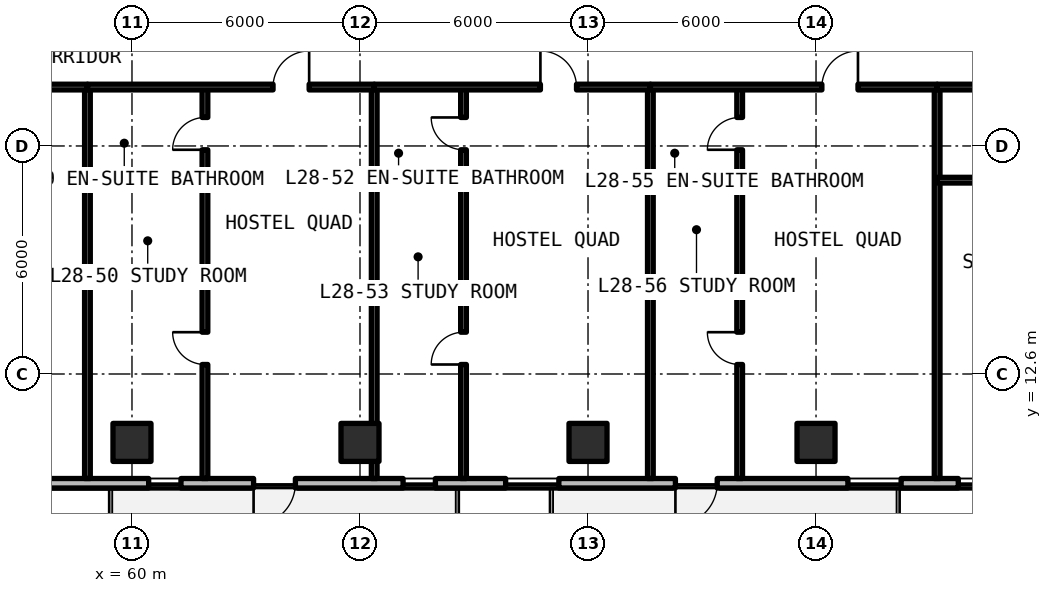
"""IFC4 building model, lengths in metres.
Left out: names, types, materials, properties, quantities, classifications, styles, units other than length and angle.
Written with IfcOpenShell. Run it as: python <this file> out.ifc"""

import sys

from ifc_helpers import new_model, si_unit, direction, frame, frame_2d, origin, origin_2d, place, context, subcontext, project, spatial, rectangle, extrude, element, fill, save


model = new_model("IFC4")
c1 = context("Model", 3, precision=1e-05, world=origin(), true_north=direction((0.0, 1.0)))
c2 = subcontext(c1, "Body", "Model", "MODEL_VIEW")
j1 = project(units=[si_unit("LENGTHUNIT", "METRE"), si_unit("PLANEANGLEUNIT", "RADIAN")], contexts=[c1])
p1 = place(None, origin())
s1 = spatial("IfcSite", under=j1, at=p1, CompositionType="ELEMENT")
p2 = place(p1, origin())
s2 = spatial("IfcBuilding", under=s1, at=p2, CompositionType="ELEMENT")
p3 = place(p2, frame((0.0, 0.0, 101.97)))
s3 = spatial("IfcBuildingStorey", under=s2, at=p3, CompositionType="ELEMENT", Elevation=101.97)
for number, where, z_axis, x_axis in (
    (1, (60.0, 10.8, 0.0), (0.0, 0.0, 1.0), (1.0, 0.0, 0.0)),
    (2, (66.0, 10.8, 0.0), (0.0, 0.0, 1.0), (1.0, 0.0, 0.0)),
    (3, (72.0, 10.8, 0.0), (0.0, 0.0, 1.0), (1.0, 0.0, 0.0)),
    (4, (78.0, 10.8, 0.0), (0.0, 0.0, 1.0), (1.0, 0.0, 0.0)),
):
    element("IfcColumn", number, at=place(p3, frame(where, z_axis=z_axis, x_axis=x_axis)), inside=s3, PredefinedType="COLUMN", context=c2, shape_type="SweptSolid", body=[
        extrude(rectangle(XDim=1.0, YDim=1.0, at=origin_2d()), origin(), (0.0, 0.0, 1.0), 3.3),
    ])
p4 = place(p3, frame((52.125, 9.725, 0.0), z_axis=(0.0, 0.0, 1.0), x_axis=(1.0, 0.0, 0.0)))
e5 = element("IfcWall", 5, at=p4, inside=s3, PredefinedType="SOLIDWALL", context=c2, shape_type="SweptSolid", body=[
    extrude(rectangle(XDim=44.023, YDim=0.25, at=frame_2d((22.012, 0.0))), origin(), (0.0, 0.0, 1.0), 3.08),
])
p5 = place(p4, frame((11.075, 0.0, 0.0)))
e6 = element("IfcOpeningElement", 6, at=p5, cuts=e5, PredefinedType="OPENING", context=c2, shape_type="SweptSolid", body=[
    extrude(rectangle(XDim=1.1, YDim=2.15, at=frame_2d((0.55, 1.075))), frame((0.0, 0.135, 0.0), z_axis=(0.0, -1.0, 0.0), x_axis=(1.0, 0.0, 0.0)), (0.0, 0.0, 1.0), 0.27),
])
p6 = place(p4, frame((22.175, 0.0, 0.0)))
e7 = element("IfcOpeningElement", 7, at=p6, cuts=e5, PredefinedType="OPENING", context=c2, shape_type="SweptSolid", body=[
    extrude(rectangle(XDim=1.1, YDim=2.15, at=frame_2d((0.55, 1.075))), frame((0.0, 0.135, 0.0), z_axis=(0.0, -1.0, 0.0), x_axis=(1.0, 0.0, 0.0)), (0.0, 0.0, 1.0), 0.27),
])
p7 = place(p4, frame((34.525, 0.0, 0.0)))
e8 = element("IfcOpeningElement", 8, at=p7, cuts=e5, PredefinedType="OPENING", context=c2, shape_type="SweptSolid", body=[
    extrude(rectangle(XDim=1.1, YDim=2.15, at=frame_2d((0.55, 1.075))), frame((0.0, 0.135, 0.0), z_axis=(0.0, -1.0, 0.0), x_axis=(1.0, 0.0, 0.0)), (0.0, 0.0, 1.0), 0.27),
])
p8 = place(p4, frame((2.669, 0.0, 0.78)))
e9 = element("IfcOpeningElement", 9, at=p8, cuts=e5, PredefinedType="OPENING", context=c2, shape_type="SweptSolid", body=[
    extrude(rectangle(XDim=2.0, YDim=1.66, at=frame_2d((1.0, 0.83))), frame((0.0, 0.135, 0.0), z_axis=(0.0, -1.0, 0.0), x_axis=(1.0, 0.0, 0.0)), (0.0, 0.0, 1.0), 0.27),
])
p9 = place(p4, frame((8.314, 0.0, 0.78)))
e10 = element("IfcOpeningElement", 10, at=p9, cuts=e5, PredefinedType="OPENING", context=c2, shape_type="SweptSolid", body=[
    extrude(rectangle(XDim=0.85, YDim=1.65, at=frame_2d((0.425, 0.825))), frame((0.0, 0.135, 0.0), z_axis=(0.0, -1.0, 0.0), x_axis=(1.0, 0.0, 0.0)), (0.0, 0.0, 1.0), 0.27),
])
p10 = place(p4, frame((15.009, 0.0, 0.78)))
e11 = element("IfcOpeningElement", 11, at=p10, cuts=e5, PredefinedType="OPENING", context=c2, shape_type="SweptSolid", body=[
    extrude(rectangle(XDim=0.85, YDim=1.65, at=frame_2d((0.425, 0.825))), frame((0.0, 0.135, 0.0), z_axis=(0.0, -1.0, 0.0), x_axis=(1.0, 0.0, 0.0)), (0.0, 0.0, 1.0), 0.27),
])
p11 = place(p4, frame((17.708, 0.0, 0.78)))
e12 = element("IfcOpeningElement", 12, at=p11, cuts=e5, PredefinedType="OPENING", context=c2, shape_type="SweptSolid", body=[
    extrude(rectangle(XDim=1.4, YDim=1.65, at=frame_2d((0.7, 0.825))), frame((0.0, 0.135, 0.0), z_axis=(0.0, -1.0, 0.0), x_axis=(1.0, 0.0, 0.0)), (0.0, 0.0, 1.0), 0.27),
])
p12 = place(p4, frame((26.714, 0.0, 0.78)))
e13 = element("IfcOpeningElement", 13, at=p12, cuts=e5, PredefinedType="OPENING", context=c2, shape_type="SweptSolid", body=[
    extrude(rectangle(XDim=1.4, YDim=1.65, at=frame_2d((0.7, 0.825))), frame((0.0, 0.135, 0.0), z_axis=(0.0, -1.0, 0.0), x_axis=(1.0, 0.0, 0.0)), (0.0, 0.0, 1.0), 0.27),
])
p13 = place(p4, frame((29.618, 0.0, 0.78)))
e14 = element("IfcOpeningElement", 14, at=p13, cuts=e5, PredefinedType="OPENING", context=c2, shape_type="SweptSolid", body=[
    extrude(rectangle(XDim=1.4, YDim=1.65, at=frame_2d((0.7, 0.825))), frame((0.0, 0.135, 0.0), z_axis=(0.0, -1.0, 0.0), x_axis=(1.0, 0.0, 0.0)), (0.0, 0.0, 1.0), 0.27),
])
p14 = place(p4, frame((39.102, 0.0, 0.78)))
e15 = element("IfcOpeningElement", 15, at=p14, cuts=e5, PredefinedType="OPENING", context=c2, shape_type="SweptSolid", body=[
    extrude(rectangle(XDim=2.0, YDim=1.66, at=frame_2d((1.0, 0.83))), frame((0.0, 0.135, 0.0), z_axis=(0.0, -1.0, 0.0), x_axis=(1.0, 0.0, 0.0)), (0.0, 0.0, 1.0), 0.27),
])
p15 = place(p3, frame((58.828, 9.85, 0.0), z_axis=(0.0, 0.0, 1.0), x_axis=(0.0, 1.0, 0.0)))
e16 = element("IfcWall", 16, at=p15, inside=s3, PredefinedType="SOLIDWALL", context=c2, shape_type="SweptSolid", body=[
    extrude(rectangle(XDim=10.3, YDim=0.15, at=frame_2d((5.15, 0.0))), origin(), (0.0, 0.0, 1.0), 2.35),
])
p16 = place(p3, frame((52.12, 20.15, 0.0), z_axis=(0.0, 0.0, 1.0), x_axis=(1.0, 0.0, 0.0)))
e17 = element("IfcWall", 17, at=p16, inside=s3, PredefinedType="SOLIDWALL", context=c2, shape_type="SweptSolid", body=[
    extrude(rectangle(XDim=6.708, YDim=0.15, at=frame_2d((3.354, 0.0))), origin(), (0.0, 0.0, 1.0), 2.35),
])
p17 = place(p16, frame((2.879, 0.0, 0.0)))
e18 = element("IfcOpeningElement", 18, at=p17, cuts=e17, PredefinedType="OPENING", context=c2, shape_type="SweptSolid", body=[
    extrude(rectangle(XDim=0.95, YDim=2.15, at=frame_2d((0.475, 1.075))), frame((0.0, 0.085, 0.0), z_axis=(0.0, -1.0, 0.0), x_axis=(1.0, 0.0, 0.0)), (0.0, 0.0, 1.0), 0.17),
])
p18 = place(p3, frame((66.374, 9.85, 0.0), z_axis=(0.0, 0.0, 1.0), x_axis=(0.0, 1.0, 0.0)))
e19 = element("IfcWall", 19, at=p18, inside=s3, PredefinedType="SOLIDWALL", context=c2, shape_type="SweptSolid", body=[
    extrude(rectangle(XDim=10.3, YDim=0.15, at=frame_2d((5.15, 0.0))), origin(), (0.0, 0.0, 1.0), 2.35),
])
p19 = place(p3, frame((58.828, 17.7, 0.0), z_axis=(0.0, 0.0, 1.0), x_axis=(1.0, 0.0, 0.0)))
e20 = element("IfcWall", 20, at=p19, inside=s3, PredefinedType="PARTITIONING", context=c2, shape_type="SweptSolid", body=[
    extrude(rectangle(XDim=3.092, YDim=0.15, at=frame_2d((1.546, 0.0))), origin(), (0.0, 0.0, 1.0), 2.35),
])
p20 = place(p3, frame((61.92, 9.85, 0.0), z_axis=(0.0, 0.0, 1.0), x_axis=(0.0, 1.0, 0.0)))
e21 = element("IfcWall", 21, at=p20, inside=s3, PredefinedType="PARTITIONING", context=c2, shape_type="SweptSolid", body=[
    extrude(rectangle(XDim=10.3, YDim=0.15, at=frame_2d((5.15, 0.0))), origin(), (0.0, 0.0, 1.0), 2.35),
])
p21 = place(p20, frame((3.0, 0.0, 0.0)))
e22 = element("IfcOpeningElement", 22, at=p21, cuts=e21, PredefinedType="OPENING", context=c2, shape_type="SweptSolid", body=[
    extrude(rectangle(XDim=0.85, YDim=2.1, at=frame_2d((0.425, 1.05))), frame((0.0, 0.085, 0.0), z_axis=(0.0, -1.0, 0.0), x_axis=(1.0, 0.0, 0.0)), (0.0, 0.0, 1.0), 0.17),
])
p22 = place(p20, frame((8.65, 0.0, 0.0)))
e23 = element("IfcOpeningElement", 23, at=p22, cuts=e21, PredefinedType="OPENING", context=c2, shape_type="SweptSolid", body=[
    extrude(rectangle(XDim=0.85, YDim=2.1, at=frame_2d((0.425, 1.05))), frame((0.0, 0.085, 0.0), z_axis=(0.0, -1.0, 0.0), x_axis=(1.0, 0.0, 0.0)), (0.0, 0.0, 1.0), 0.17),
])
p23 = place(p3, frame((58.828, 20.15, 0.0), z_axis=(0.0, 0.0, 1.0), x_axis=(1.0, 0.0, 0.0)))
e24 = element("IfcWall", 24, at=p23, inside=s3, PredefinedType="SOLIDWALL", context=c2, shape_type="SweptSolid", body=[
    extrude(rectangle(XDim=7.546, YDim=0.15, at=frame_2d((3.773, 0.0))), origin(), (0.0, 0.0, 1.0), 2.35),
])
p24 = place(p23, frame((4.884, 0.0, 0.0)))
e25 = element("IfcOpeningElement", 25, at=p24, cuts=e24, PredefinedType="OPENING", context=c2, shape_type="SweptSolid", body=[
    extrude(rectangle(XDim=0.95, YDim=2.15, at=frame_2d((0.475, 1.075))), frame((0.0, 0.085, 0.0), z_axis=(0.0, -1.0, 0.0), x_axis=(1.0, 0.0, 0.0)), (0.0, 0.0, 1.0), 0.17),
])
p25 = place(p3, frame((73.641, 9.85, 0.0), z_axis=(0.0, 0.0, 1.0), x_axis=(0.0, 1.0, 0.0)))
e26 = element("IfcWall", 26, at=p25, inside=s3, PredefinedType="SOLIDWALL", context=c2, shape_type="SweptSolid", body=[
    extrude(rectangle(XDim=10.3, YDim=0.15, at=frame_2d((5.15, 0.0))), origin(), (0.0, 0.0, 1.0), 2.35),
])
p26 = place(p3, frame((66.374, 17.7, 0.0), z_axis=(0.0, 0.0, 1.0), x_axis=(1.0, 0.0, 0.0)))
e27 = element("IfcWall", 27, at=p26, inside=s3, PredefinedType="PARTITIONING", context=c2, shape_type="SweptSolid", body=[
    extrude(rectangle(XDim=2.35, YDim=0.15, at=frame_2d((1.175, 0.0))), origin(), (0.0, 0.0, 1.0), 2.35),
])
p27 = place(p3, frame((68.724, 9.85, 0.0), z_axis=(0.0, 0.0, 1.0), x_axis=(0.0, 1.0, 0.0)))
e28 = element("IfcWall", 28, at=p27, inside=s3, PredefinedType="PARTITIONING", context=c2, shape_type="SweptSolid", body=[
    extrude(rectangle(XDim=10.3, YDim=0.15, at=frame_2d((5.15, 0.0))), origin(), (0.0, 0.0, 1.0), 2.35),
])
p28 = place(p27, frame((3.0, 0.0, 0.0)))
e29 = element("IfcOpeningElement", 29, at=p28, cuts=e28, PredefinedType="OPENING", context=c2, shape_type="SweptSolid", body=[
    extrude(rectangle(XDim=0.85, YDim=2.1, at=frame_2d((0.425, 1.05))), frame((0.0, 0.085, 0.0), z_axis=(0.0, -1.0, 0.0), x_axis=(1.0, 0.0, 0.0)), (0.0, 0.0, 1.0), 0.17),
])
p29 = place(p27, frame((8.65, 0.0, 0.0)))
e30 = element("IfcOpeningElement", 30, at=p29, cuts=e28, PredefinedType="OPENING", context=c2, shape_type="SweptSolid", body=[
    extrude(rectangle(XDim=0.85, YDim=2.1, at=frame_2d((0.425, 1.05))), frame((0.0, 0.085, 0.0), z_axis=(0.0, -1.0, 0.0), x_axis=(1.0, 0.0, 0.0)), (0.0, 0.0, 1.0), 0.17),
])
p30 = place(p3, frame((66.374, 20.15, 0.0), z_axis=(0.0, 0.0, 1.0), x_axis=(1.0, 0.0, 0.0)))
e31 = element("IfcWall", 31, at=p30, inside=s3, PredefinedType="SOLIDWALL", context=c2, shape_type="SweptSolid", body=[
    extrude(rectangle(XDim=7.267, YDim=0.15, at=frame_2d((3.633, 0.0))), origin(), (0.0, 0.0, 1.0), 2.35),
])
p31 = place(p30, frame((4.373, 0.0, 0.0)))
e32 = element("IfcOpeningElement", 32, at=p31, cuts=e31, PredefinedType="OPENING", context=c2, shape_type="SweptSolid", body=[
    extrude(rectangle(XDim=0.95, YDim=2.15, at=frame_2d((0.475, 1.075))), frame((0.0, 0.085, 0.0), z_axis=(0.0, -1.0, 0.0), x_axis=(1.0, 0.0, 0.0)), (0.0, 0.0, 1.0), 0.17),
])
p32 = place(p3, frame((81.187, 9.85, 0.0), z_axis=(0.0, 0.0, 1.0), x_axis=(0.0, 1.0, 0.0)))
e33 = element("IfcWall", 33, at=p32, inside=s3, PredefinedType="SOLIDWALL", context=c2, shape_type="SweptSolid", body=[
    extrude(rectangle(XDim=10.3, YDim=0.15, at=frame_2d((5.15, 0.0))), origin(), (0.0, 0.0, 1.0), 2.35),
])
p33 = place(p3, frame((73.641, 17.7, 0.0), z_axis=(0.0, 0.0, 1.0), x_axis=(1.0, 0.0, 0.0)))
e34 = element("IfcWall", 34, at=p33, inside=s3, PredefinedType="PARTITIONING", context=c2, shape_type="SweptSolid", body=[
    extrude(rectangle(XDim=2.35, YDim=0.15, at=frame_2d((1.175, 0.0))), origin(), (0.0, 0.0, 1.0), 2.35),
])
p34 = place(p3, frame((75.991, 9.85, 0.0), z_axis=(0.0, 0.0, 1.0), x_axis=(0.0, 1.0, 0.0)))
e35 = element("IfcWall", 35, at=p34, inside=s3, PredefinedType="PARTITIONING", context=c2, shape_type="SweptSolid", body=[
    extrude(rectangle(XDim=10.3, YDim=0.15, at=frame_2d((5.15, 0.0))), origin(), (0.0, 0.0, 1.0), 2.35),
])
p35 = place(p34, frame((3.0, 0.0, 0.0)))
e36 = element("IfcOpeningElement", 36, at=p35, cuts=e35, PredefinedType="OPENING", context=c2, shape_type="SweptSolid", body=[
    extrude(rectangle(XDim=0.85, YDim=2.1, at=frame_2d((0.425, 1.05))), frame((0.0, 0.085, 0.0), z_axis=(0.0, -1.0, 0.0), x_axis=(1.0, 0.0, 0.0)), (0.0, 0.0, 1.0), 0.17),
])
p36 = place(p34, frame((8.65, 0.0, 0.0)))
e37 = element("IfcOpeningElement", 37, at=p36, cuts=e35, PredefinedType="OPENING", context=c2, shape_type="SweptSolid", body=[
    extrude(rectangle(XDim=0.85, YDim=2.1, at=frame_2d((0.425, 1.05))), frame((0.0, 0.085, 0.0), z_axis=(0.0, -1.0, 0.0), x_axis=(1.0, 0.0, 0.0)), (0.0, 0.0, 1.0), 0.17),
])
p37 = place(p3, frame((73.641, 20.15, 0.0), z_axis=(0.0, 0.0, 1.0), x_axis=(1.0, 0.0, 0.0)))
e38 = element("IfcWall", 38, at=p37, inside=s3, PredefinedType="SOLIDWALL", context=c2, shape_type="SweptSolid", body=[
    extrude(rectangle(XDim=7.546, YDim=0.15, at=frame_2d((3.773, 0.0))), origin(), (0.0, 0.0, 1.0), 2.35),
])
p38 = place(p37, frame((4.513, 0.0, 0.0)))
e39 = element("IfcOpeningElement", 39, at=p38, cuts=e38, PredefinedType="OPENING", context=c2, shape_type="SweptSolid", body=[
    extrude(rectangle(XDim=0.95, YDim=2.15, at=frame_2d((0.475, 1.075))), frame((0.0, 0.085, 0.0), z_axis=(0.0, -1.0, 0.0), x_axis=(1.0, 0.0, 0.0)), (0.0, 0.0, 1.0), 0.17),
])
p39 = place(p3, frame((81.187, 17.7, 0.0), z_axis=(0.0, 0.0, 1.0), x_axis=(1.0, 0.0, 0.0)))
e40 = element("IfcWall", 40, at=p39, inside=s3, PredefinedType="PARTITIONING", context=c2, shape_type="SweptSolid", body=[
    extrude(rectangle(XDim=4.733, YDim=0.15, at=frame_2d((2.366, 0.0))), origin(), (0.0, 0.0, 1.0), 2.35),
])
p40 = place(p3, frame((81.187, 20.15, 0.0), z_axis=(0.0, 0.0, 1.0), x_axis=(1.0, 0.0, 0.0)))
e41 = element("IfcWall", 41, at=p40, inside=s3, PredefinedType="SOLIDWALL", context=c2, shape_type="SweptSolid", body=[
    extrude(rectangle(XDim=7.267, YDim=0.15, at=frame_2d((3.633, 0.0))), origin(), (0.0, 0.0, 1.0), 2.35),
])
p41 = place(p40, frame((5.565, 0.0, 0.0)))
e42 = element("IfcOpeningElement", 42, at=p41, cuts=e41, PredefinedType="OPENING", context=c2, shape_type="SweptSolid", body=[
    extrude(rectangle(XDim=0.95, YDim=2.15, at=frame_2d((0.475, 1.075))), frame((0.0, 0.085, 0.0), z_axis=(0.0, -1.0, 0.0), x_axis=(1.0, 0.0, 0.0)), (0.0, 0.0, 1.0), 0.17),
])
p42 = place(p5, frame((1.1, 0.0, 0.0), z_axis=(0.0, 0.0, 1.0), x_axis=(-1.0, 0.0, 0.0)))
e43 = element("IfcDoor", 43, at=p42, inside=s3, OperationType="SINGLE_SWING_LEFT", PredefinedType="DOOR", context=c2, shape_type="SweptSolid", body=[
    extrude(rectangle(XDim=1.1, YDim=2.15, at=frame_2d((0.55, 1.075))), frame((0.0, 0.025, 0.0), z_axis=(0.0, -1.0, 0.0), x_axis=(1.0, 0.0, 0.0)), (0.0, 0.0, 1.0), 0.05),
])
fill(e6, e43)
p43 = place(p6, frame((1.1, 0.0, 0.0), z_axis=(0.0, 0.0, 1.0), x_axis=(-1.0, 0.0, 0.0)))
e44 = element("IfcDoor", 44, at=p43, inside=s3, OperationType="SINGLE_SWING_RIGHT", PredefinedType="DOOR", context=c2, shape_type="SweptSolid", body=[
    extrude(rectangle(XDim=1.1, YDim=2.15, at=frame_2d((0.55, 1.075))), frame((0.0, 0.025, 0.0), z_axis=(0.0, -1.0, 0.0), x_axis=(1.0, 0.0, 0.0)), (0.0, 0.0, 1.0), 0.05),
])
fill(e7, e44)
p44 = place(p9, origin())
e45 = element("IfcWindow", 45, at=p44, inside=s3, PartitioningType="SINGLE_PANEL", PredefinedType="WINDOW", context=c2, shape_type="SweptSolid", body=[
    extrude(rectangle(XDim=0.85, YDim=1.65, at=frame_2d((0.425, 0.825))), frame((0.0, 0.03, 0.0), z_axis=(0.0, -1.0, 0.0), x_axis=(1.0, 0.0, 0.0)), (0.0, 0.0, 1.0), 0.06),
])
fill(e10, e45)
p45 = place(p10, origin())
e46 = element("IfcWindow", 46, at=p45, inside=s3, PartitioningType="SINGLE_PANEL", PredefinedType="WINDOW", context=c2, shape_type="SweptSolid", body=[
    extrude(rectangle(XDim=0.85, YDim=1.65, at=frame_2d((0.425, 0.825))), frame((0.0, 0.03, 0.0), z_axis=(0.0, -1.0, 0.0), x_axis=(1.0, 0.0, 0.0)), (0.0, 0.0, 1.0), 0.06),
])
fill(e11, e46)
p46 = place(p11, origin())
e47 = element("IfcWindow", 47, at=p46, inside=s3, PartitioningType="SINGLE_PANEL", PredefinedType="WINDOW", context=c2, shape_type="SweptSolid", body=[
    extrude(rectangle(XDim=1.4, YDim=1.65, at=frame_2d((0.7, 0.825))), frame((0.0, 0.03, 0.0), z_axis=(0.0, -1.0, 0.0), x_axis=(1.0, 0.0, 0.0)), (0.0, 0.0, 1.0), 0.06),
])
fill(e12, e47)
p47 = place(p12, origin())
e48 = element("IfcWindow", 48, at=p47, inside=s3, PartitioningType="SINGLE_PANEL", PredefinedType="WINDOW", context=c2, shape_type="SweptSolid", body=[
    extrude(rectangle(XDim=1.4, YDim=1.65, at=frame_2d((0.7, 0.825))), frame((0.0, 0.03, 0.0), z_axis=(0.0, -1.0, 0.0), x_axis=(1.0, 0.0, 0.0)), (0.0, 0.0, 1.0), 0.06),
])
fill(e13, e48)
p48 = place(p13, origin())
e49 = element("IfcWindow", 49, at=p48, inside=s3, PartitioningType="SINGLE_PANEL", PredefinedType="WINDOW", context=c2, shape_type="SweptSolid", body=[
    extrude(rectangle(XDim=1.4, YDim=1.65, at=frame_2d((0.7, 0.825))), frame((0.0, 0.03, 0.0), z_axis=(0.0, -1.0, 0.0), x_axis=(1.0, 0.0, 0.0)), (0.0, 0.0, 1.0), 0.06),
])
fill(e14, e49)
p49 = place(p21, origin())
e50 = element("IfcDoor", 50, at=p49, inside=s3, OperationType="SINGLE_SWING_RIGHT", PredefinedType="DOOR", context=c2, shape_type="SweptSolid", body=[
    extrude(rectangle(XDim=0.85, YDim=2.1, at=frame_2d((0.425, 1.05))), frame((0.0, 0.025, 0.0), z_axis=(0.0, -1.0, 0.0), x_axis=(1.0, 0.0, 0.0)), (0.0, 0.0, 1.0), 0.05),
])
fill(e22, e50)
p50 = place(p22, origin())
e51 = element("IfcDoor", 51, at=p50, inside=s3, OperationType="SINGLE_SWING_LEFT", PredefinedType="DOOR", context=c2, shape_type="SweptSolid", body=[
    extrude(rectangle(XDim=0.85, YDim=2.1, at=frame_2d((0.425, 1.05))), frame((0.0, 0.025, 0.0), z_axis=(0.0, -1.0, 0.0), x_axis=(1.0, 0.0, 0.0)), (0.0, 0.0, 1.0), 0.05),
])
fill(e23, e51)
p51 = place(p24, origin())
e52 = element("IfcDoor", 52, at=p51, inside=s3, OperationType="SINGLE_SWING_RIGHT", PredefinedType="DOOR", context=c2, shape_type="SweptSolid", body=[
    extrude(rectangle(XDim=0.95, YDim=2.15, at=frame_2d((0.475, 1.075))), frame((0.0, 0.025, 0.0), z_axis=(0.0, -1.0, 0.0), x_axis=(1.0, 0.0, 0.0)), (0.0, 0.0, 1.0), 0.05),
])
fill(e25, e52)
p52 = place(p28, origin())
e53 = element("IfcDoor", 53, at=p52, inside=s3, OperationType="SINGLE_SWING_LEFT", PredefinedType="DOOR", context=c2, shape_type="SweptSolid", body=[
    extrude(rectangle(XDim=0.85, YDim=2.1, at=frame_2d((0.425, 1.05))), frame((0.0, 0.025, 0.0), z_axis=(0.0, -1.0, 0.0), x_axis=(1.0, 0.0, 0.0)), (0.0, 0.0, 1.0), 0.05),
])
fill(e29, e53)
p53 = place(p29, origin())
e54 = element("IfcDoor", 54, at=p53, inside=s3, OperationType="SINGLE_SWING_RIGHT", PredefinedType="DOOR", context=c2, shape_type="SweptSolid", body=[
    extrude(rectangle(XDim=0.85, YDim=2.1, at=frame_2d((0.425, 1.05))), frame((0.0, 0.025, 0.0), z_axis=(0.0, -1.0, 0.0), x_axis=(1.0, 0.0, 0.0)), (0.0, 0.0, 1.0), 0.05),
])
fill(e30, e54)
p54 = place(p31, origin())
e55 = element("IfcDoor", 55, at=p54, inside=s3, OperationType="SINGLE_SWING_LEFT", PredefinedType="DOOR", context=c2, shape_type="SweptSolid", body=[
    extrude(rectangle(XDim=0.95, YDim=2.15, at=frame_2d((0.475, 1.075))), frame((0.0, 0.025, 0.0), z_axis=(0.0, -1.0, 0.0), x_axis=(1.0, 0.0, 0.0)), (0.0, 0.0, 1.0), 0.05),
])
fill(e32, e55)
p55 = place(p35, origin())
e56 = element("IfcDoor", 56, at=p55, inside=s3, OperationType="SINGLE_SWING_RIGHT", PredefinedType="DOOR", context=c2, shape_type="SweptSolid", body=[
    extrude(rectangle(XDim=0.85, YDim=2.1, at=frame_2d((0.425, 1.05))), frame((0.0, 0.025, 0.0), z_axis=(0.0, -1.0, 0.0), x_axis=(1.0, 0.0, 0.0)), (0.0, 0.0, 1.0), 0.05),
])
fill(e36, e56)
p56 = place(p36, origin())
e57 = element("IfcDoor", 57, at=p56, inside=s3, OperationType="SINGLE_SWING_LEFT", PredefinedType="DOOR", context=c2, shape_type="SweptSolid", body=[
    extrude(rectangle(XDim=0.85, YDim=2.1, at=frame_2d((0.425, 1.05))), frame((0.0, 0.025, 0.0), z_axis=(0.0, -1.0, 0.0), x_axis=(1.0, 0.0, 0.0)), (0.0, 0.0, 1.0), 0.05),
])
fill(e37, e57)
p57 = place(p38, origin())
e58 = element("IfcDoor", 58, at=p57, inside=s3, OperationType="SINGLE_SWING_RIGHT", PredefinedType="DOOR", context=c2, shape_type="SweptSolid", body=[
    extrude(rectangle(XDim=0.95, YDim=2.15, at=frame_2d((0.475, 1.075))), frame((0.0, 0.025, 0.0), z_axis=(0.0, -1.0, 0.0), x_axis=(1.0, 0.0, 0.0)), (0.0, 0.0, 1.0), 0.05),
])
fill(e39, e58)
save(model, sys.argv[1])
